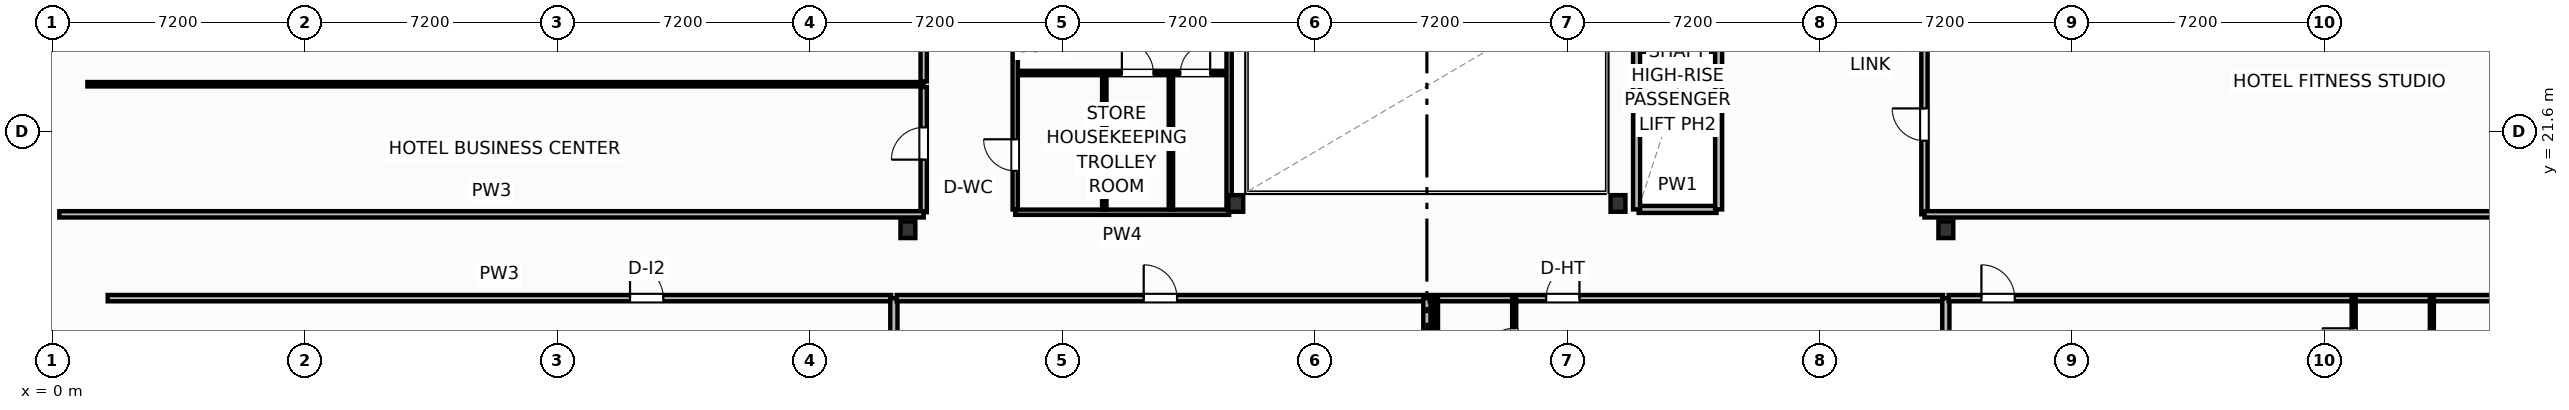
"""IFC4 building model, lengths in metres.
Left out: names, types, materials, properties, quantities, classifications, styles, units other than length and angle.
Written with IfcOpenShell. Run it as: python <this file> out.ifc"""

import sys

from ifc_helpers import new_model, si_unit, direction, frame, frame_2d, origin, origin_2d, place, context, subcontext, project, spatial, rectangle, i_section, extrude, element, fill, save


model = new_model("IFC4")
c1 = context("Model", 3, precision=1e-05, world=origin(), true_north=direction((0.0, 1.0)))
c2 = subcontext(c1, "Body", "Model", "MODEL_VIEW")
j1 = project(units=[si_unit("LENGTHUNIT", "METRE"), si_unit("PLANEANGLEUNIT", "RADIAN")], contexts=[c1])
p1 = place(None, origin())
s1 = spatial("IfcSite", under=j1, at=p1, CompositionType="ELEMENT")
p2 = place(p1, origin())
s2 = spatial("IfcBuilding", under=s1, at=p2, CompositionType="ELEMENT")
p3 = place(p2, frame((0.0, 0.0, 98.4)))
s3 = spatial("IfcBuildingStorey", under=s2, at=p3, CompositionType="ELEMENT", Elevation=98.4)
for number, where, z_axis, x_axis in (
    (1, (33.75, 19.55, 0.0), (0.0, 0.0, 1.0), (1.0, 0.0, 0.0)),
    (2, (44.65, 19.55, 0.0), (0.0, 0.0, 1.0), (1.0, 0.0, 0.0)),
    (3, (24.4, 18.8, 0.0), (0.0, 0.0, 1.0), (1.0, 0.0, 0.0)),
    (4, (54.0, 18.8, 0.0), (0.0, 0.0, 1.0), (1.0, 0.0, 0.0)),
):
    element("IfcColumn", number, at=place(p3, frame(where, z_axis=z_axis, x_axis=x_axis)), inside=s3, PredefinedType="COLUMN", context=c2, shape_type="SweptSolid", body=[
        extrude(i_section(OverallWidth=0.424, OverallDepth=0.474, WebThickness=0.048, FlangeThickness=0.077, FilletRadius=0.025, at=origin_2d()), origin(), (0.0, 0.0, 1.0), 3.7),
    ])
p4 = place(p3, frame((1.58, 16.85, 0.0), z_axis=(0.0, 0.0, 1.0), x_axis=(1.0, 0.0, 0.0)))
e5 = element("IfcWall", 5, at=p4, inside=s3, PredefinedType="PARTITIONING", context=c2, shape_type="SweptSolid", body=[
    extrude(rectangle(XDim=22.34, YDim=0.18, at=frame_2d((11.17, 0.0))), origin(), (0.0, 0.0, 1.0), 3.45),
])
p5 = place(p4, frame((14.895, 0.0, 0.0)))
e6 = element("IfcOpeningElement", 6, at=p5, cuts=e5, PredefinedType="OPENING", context=c2, shape_type="SweptSolid", body=[
    extrude(rectangle(XDim=0.95, YDim=2.05, at=frame_2d((0.475, 1.025))), frame((0.0, 0.1, 0.0), z_axis=(0.0, -1.0, 0.0), x_axis=(1.0, 0.0, 0.0)), (0.0, 0.0, 1.0), 0.2),
])
p6 = place(p3, frame((24.0, 6.076, 0.0), z_axis=(0.0, 0.0, 1.0), x_axis=(0.0, 1.0, 0.0)))
e7 = element("IfcWall", 7, at=p6, inside=s3, PredefinedType="PARTITIONING", context=c2, shape_type="SweptSolid", body=[
    extrude(rectangle(XDim=10.774, YDim=0.205, at=frame_2d((5.387, 0.0))), origin(), (0.0, 0.0, 1.0), 2.58),
])
p7 = place(p3, frame((24.08, 16.85, 0.0), z_axis=(0.0, 0.0, 1.0), x_axis=(1.0, 0.0, 0.0)))
e8 = element("IfcWall", 8, at=p7, inside=s3, PredefinedType="PARTITIONING", context=c2, shape_type="SweptSolid", body=[
    extrude(rectangle(XDim=15.04, YDim=0.18, at=frame_2d((7.52, 0.0))), origin(), (0.0, 0.0, 1.0), 3.45),
])
p8 = place(p7, frame((7.045, 0.0, 0.0)))
e9 = element("IfcOpeningElement", 9, at=p8, cuts=e8, PredefinedType="OPENING", context=c2, shape_type="SweptSolid", body=[
    extrude(rectangle(XDim=0.95, YDim=2.05, at=frame_2d((0.475, 1.025))), frame((0.0, 0.1, 0.0), z_axis=(0.0, -1.0, 0.0), x_axis=(1.0, 0.0, 0.0)), (0.0, 0.0, 1.0), 0.2),
])
p9 = place(p3, frame((39.2, 0.322, 0.0), z_axis=(0.0, 0.0, 1.0), x_axis=(0.0, 1.0, 0.0)))
e10 = element("IfcWall", 10, at=p9, inside=s3, PredefinedType="PARTITIONING", context=c2, shape_type="SweptSolid", body=[
    extrude(rectangle(XDim=16.528, YDim=0.205, at=frame_2d((8.264, 0.0))), origin(), (0.0, 0.0, 1.0), 3.45),
])
p10 = place(p3, frame((39.28, 16.85, 0.0), z_axis=(0.0, 0.0, 1.0), x_axis=(1.0, 0.0, 0.0)))
e11 = element("IfcWall", 11, at=p10, inside=s3, PredefinedType="PARTITIONING", context=c2, shape_type="SweptSolid", body=[
    extrude(rectangle(XDim=14.64, YDim=0.18, at=frame_2d((7.32, 0.0))), origin(), (0.0, 0.0, 1.0), 3.45),
])
p11 = place(p10, frame((3.322, 0.0, 0.0)))
e12 = element("IfcOpeningElement", 12, at=p11, cuts=e11, PredefinedType="OPENING", context=c2, shape_type="SweptSolid", body=[
    extrude(rectangle(XDim=0.95, YDim=2.15, at=frame_2d((0.475, 1.075))), frame((0.0, 0.1, 0.0), z_axis=(0.0, -1.0, 0.0), x_axis=(1.0, 0.0, 0.0)), (0.0, 0.0, 1.0), 0.2),
])
p12 = place(p3, frame((41.69, 14.33, 0.0), z_axis=(0.0, 0.0, 1.0), x_axis=(0.0, 1.0, 0.0)))
e13 = element("IfcWall", 13, at=p12, inside=s3, PredefinedType="PARTITIONING", context=c2, shape_type="SweptSolid", body=[
    extrude(rectangle(XDim=2.52, YDim=0.115, at=frame_2d((1.26, 0.0))), origin(), (0.0, 0.0, 1.0), 3.45),
])
p13 = place(p12, frame((0.76, 0.0, 0.0)))
e14 = element("IfcOpeningElement", 14, at=p13, cuts=e13, PredefinedType="OPENING", context=c2, shape_type="SweptSolid", body=[
    extrude(rectangle(XDim=0.9, YDim=2.05, at=frame_2d((0.45, 1.025))), frame((0.0, 0.067, 0.0), z_axis=(0.0, -1.0, 0.0), x_axis=(1.0, 0.0, 0.0)), (0.0, 0.0, 1.0), 0.135),
])
p14 = place(p3, frame((39.46, 14.33, 0.0), z_axis=(0.0, 0.0, 1.0), x_axis=(0.0, 1.0, 0.0)))
e15 = element("IfcWall", 15, at=p14, inside=s3, PredefinedType="PARTITIONING", context=c2, shape_type="SweptSolid", body=[
    extrude(rectangle(XDim=2.52, YDim=0.115, at=frame_2d((1.26, 0.0))), origin(), (0.0, 0.0, 1.0), 3.45),
])
p15 = place(p3, frame((54.0, -4.0, 0.0), z_axis=(0.0, 0.0, 1.0), x_axis=(0.0, 1.0, 0.0)))
e16 = element("IfcWall", 16, at=p15, inside=s3, PredefinedType="PARTITIONING", context=c2, shape_type="SweptSolid", body=[
    extrude(rectangle(XDim=20.85, YDim=0.205, at=frame_2d((10.425, 0.0))), origin(), (0.0, 0.0, 1.0), 3.45),
])
p16 = place(p3, frame((54.08, 16.85, 0.0), z_axis=(0.0, 0.0, 1.0), x_axis=(1.0, 0.0, 0.0)))
e17 = element("IfcWall", 17, at=p16, inside=s3, PredefinedType="PARTITIONING", context=c2, shape_type="SweptSolid", body=[
    extrude(rectangle(XDim=21.722, YDim=0.18, at=frame_2d((10.861, 0.0))), origin(), (0.0, 0.0, 1.0), 2.58),
])
p17 = place(p16, frame((0.934, 0.0, 0.0)))
e18 = element("IfcOpeningElement", 18, at=p17, cuts=e17, PredefinedType="OPENING", context=c2, shape_type="SweptSolid", body=[
    extrude(rectangle(XDim=0.95, YDim=2.15, at=frame_2d((0.475, 1.075))), frame((0.0, 0.1, 0.0), z_axis=(0.0, -1.0, 0.0), x_axis=(1.0, 0.0, 0.0)), (0.0, 0.0, 1.0), 0.2),
])
p18 = place(p3, frame((65.63, 14.33, 0.0), z_axis=(0.0, 0.0, 1.0), x_axis=(0.0, 1.0, 0.0)))
e19 = element("IfcWall", 19, at=p18, inside=s3, PredefinedType="PARTITIONING", context=c2, shape_type="SweptSolid", body=[
    extrude(rectangle(XDim=2.52, YDim=0.115, at=frame_2d((1.26, 0.0))), origin(), (0.0, 0.0, 1.0), 3.45),
])
p19 = place(p18, frame((0.76, 0.0, 0.0)))
e20 = element("IfcOpeningElement", 20, at=p19, cuts=e19, PredefinedType="OPENING", context=c2, shape_type="SweptSolid", body=[
    extrude(rectangle(XDim=0.9, YDim=2.05, at=frame_2d((0.45, 1.025))), frame((0.0, 0.067, 0.0), z_axis=(0.0, -1.0, 0.0), x_axis=(1.0, 0.0, 0.0)), (0.0, 0.0, 1.0), 0.135),
])
p20 = place(p3, frame((67.86, 14.33, 0.0), z_axis=(0.0, 0.0, 1.0), x_axis=(0.0, 1.0, 0.0)))
e21 = element("IfcWall", 21, at=p20, inside=s3, PredefinedType="PARTITIONING", context=c2, shape_type="SweptSolid", body=[
    extrude(rectangle(XDim=2.52, YDim=0.115, at=frame_2d((1.26, 0.0))), origin(), (0.0, 0.0, 1.0), 3.45),
])
p21 = place(p3, frame((24.85, 19.3, 0.0), z_axis=(0.0, 0.0, 1.0), x_axis=(0.0, 1.0, 0.0)))
e22 = element("IfcWall", 22, at=p21, inside=s3, PredefinedType="PARTITIONING", context=c2, shape_type="SweptSolid", body=[
    extrude(rectangle(XDim=3.57, YDim=0.18, at=frame_2d((1.785, 0.0))), origin(), (0.0, 0.0, 1.0), 3.45),
])
p22 = place(p21, frame((1.5, 0.0, 0.0)))
e23 = element("IfcOpeningElement", 23, at=p22, cuts=e22, PredefinedType="OPENING", context=c2, shape_type="SweptSolid", body=[
    extrude(rectangle(XDim=0.92, YDim=2.05, at=frame_2d((0.46, 1.025))), frame((0.0, 0.1, 0.0), z_axis=(0.0, -1.0, 0.0), x_axis=(1.0, 0.0, 0.0)), (0.0, 0.0, 1.0), 0.2),
])
p23 = place(p3, frame((24.85, 23.03, 0.0), z_axis=(0.0, 0.0, 1.0), x_axis=(0.0, 1.0, 0.0)))
e24 = element("IfcWall", 24, at=p23, inside=s3, PredefinedType="PARTITIONING", context=c2, shape_type="SweptSolid", body=[
    extrude(rectangle(XDim=3.57, YDim=0.18, at=frame_2d((1.785, 0.0))), origin(), (0.0, 0.0, 1.0), 3.45),
])
p24 = place(p23, frame((1.5, 0.0, 0.0)))
e25 = element("IfcOpeningElement", 25, at=p24, cuts=e24, PredefinedType="OPENING", context=c2, shape_type="SweptSolid", body=[
    extrude(rectangle(XDim=0.92, YDim=2.05, at=frame_2d((0.46, 1.025))), frame((0.0, 0.1, 0.0), z_axis=(0.0, -1.0, 0.0), x_axis=(1.0, 0.0, 0.0)), (0.0, 0.0, 1.0), 0.2),
])
p25 = place(p3, frame((1.0, 22.95, 0.0), z_axis=(0.0, 0.0, 1.0), x_axis=(1.0, 0.0, 0.0)))
e26 = element("IfcWall", 26, at=p25, inside=s3, PredefinedType="PARTITIONING", context=c2, shape_type="SweptSolid", body=[
    extrude(rectangle(XDim=23.85, YDim=0.125, at=frame_2d((11.925, 0.0))), origin(), (0.0, 0.0, 1.0), 3.45),
])
p26 = place(p3, frame((0.2, 19.24, 0.0), z_axis=(0.0, 0.0, 1.0), x_axis=(1.0, 0.0, 0.0)))
e27 = element("IfcWall", 27, at=p26, inside=s3, PredefinedType="PARTITIONING", context=c2, shape_type="SweptSolid", body=[
    extrude(rectangle(XDim=24.65, YDim=0.18, at=frame_2d((12.325, 0.0))), origin(), (0.0, 0.0, 1.0), 3.45),
])
p27 = place(p3, frame((53.39, 19.24, 0.0), z_axis=(0.0, 0.0, 1.0), x_axis=(0.0, 1.0, 0.0)))
e28 = element("IfcWall", 28, at=p27, inside=s3, PredefinedType="PARTITIONING", context=c2, shape_type="SweptSolid", body=[
    extrude(rectangle(XDim=7.52, YDim=0.18, at=frame_2d((3.76, 0.0))), origin(), (0.0, 0.0, 1.0), 3.45),
])
p28 = place(p27, frame((2.1, 0.0, 0.0)))
e29 = element("IfcOpeningElement", 29, at=p28, cuts=e28, PredefinedType="OPENING", context=c2, shape_type="SweptSolid", body=[
    extrude(rectangle(XDim=0.92, YDim=2.05, at=frame_2d((0.46, 1.025))), frame((0.0, 0.1, 0.0), z_axis=(0.0, -1.0, 0.0), x_axis=(1.0, 0.0, 0.0)), (0.0, 0.0, 1.0), 0.2),
])
p29 = place(p3, frame((53.39, 19.24, 0.0), z_axis=(0.0, 0.0, 1.0), x_axis=(1.0, 0.0, 0.0)))
e30 = element("IfcWall", 30, at=p29, inside=s3, PredefinedType="PARTITIONING", context=c2, shape_type="SweptSolid", body=[
    extrude(rectangle(XDim=23.317, YDim=0.18, at=frame_2d((11.658, 0.0))), origin(), (0.0, 0.0, 1.0), 3.45),
])
p30 = place(p3, frame((27.46, 19.3, 0.0), z_axis=(0.0, 0.0, 1.0), x_axis=(1.0, 0.0, 0.0)))
e31 = element("IfcWall", 31, at=p30, inside=s3, PredefinedType="PARTITIONING", context=c2, shape_type="SweptSolid", body=[
    extrude(rectangle(XDim=6.1, YDim=0.15, at=frame_2d((3.05, 0.0))), origin(), (0.0, 0.0, 1.0), 2.662),
])
p31 = place(p3, frame((27.52, 23.27, 0.0), z_axis=(0.0, 0.0, 1.0), x_axis=(1.0, 0.0, 0.0)))
e32 = element("IfcWall", 32, at=p31, inside=s3, PredefinedType="PARTITIONING", context=c2, shape_type="SweptSolid", body=[
    extrude(rectangle(XDim=6.0, YDim=0.125, at=frame_2d((3.0, 0.0))), origin(), (0.0, 0.0, 1.0), 3.45),
])
p32 = place(p31, frame((2.982, 0.0, 0.0)))
e33 = element("IfcOpeningElement", 33, at=p32, cuts=e32, PredefinedType="OPENING", context=c2, shape_type="SweptSolid", body=[
    extrude(rectangle(XDim=0.9, YDim=2.05, at=frame_2d((0.45, 1.025))), frame((0.0, 0.073, 0.0), z_axis=(0.0, -1.0, 0.0), x_axis=(1.0, 0.0, 0.0)), (0.0, 0.0, 1.0), 0.145),
])
p33 = place(p31, frame((4.65, 0.0, 0.0)))
e34 = element("IfcOpeningElement", 34, at=p33, cuts=e32, PredefinedType="OPENING", context=c2, shape_type="SweptSolid", body=[
    extrude(rectangle(XDim=0.85, YDim=2.05, at=frame_2d((0.425, 1.025))), frame((0.0, 0.073, 0.0), z_axis=(0.0, -1.0, 0.0), x_axis=(1.0, 0.0, 0.0)), (0.0, 0.0, 1.0), 0.145),
])
for number, where, z_axis, x_axis in (
    (35, (30.0, 19.38, 0.0), (0.0, 0.0, 1.0), (0.0, 1.0, 0.0)),
    (36, (31.9, 19.38, 0.0), (0.0, 0.0, 1.0), (0.0, 1.0, 0.0)),
):
    element("IfcWall", number, at=place(p3, frame(where, z_axis=z_axis, x_axis=x_axis)), inside=s3, PredefinedType="PARTITIONING", context=c2, shape_type="SweptSolid", body=[
        extrude(rectangle(XDim=3.82, YDim=0.125, at=frame_2d((1.91, 0.0))), origin(), (0.0, 0.0, 1.0), 3.45),
    ])
p34 = place(p3, frame((27.46, 19.38, 0.0), z_axis=(0.0, 0.0, 1.0), x_axis=(0.0, 1.0, 0.0)))
e37 = element("IfcWall", 37, at=p34, inside=s3, PredefinedType="PARTITIONING", context=c2, shape_type="SweptSolid", body=[
    extrude(rectangle(XDim=7.16, YDim=0.15, at=frame_2d((3.58, 0.0))), origin(), (0.0, 0.0, 1.0), 3.45),
])
p35 = place(p34, frame((1.1, 0.0, 0.0)))
e38 = element("IfcOpeningElement", 38, at=p35, cuts=e37, PredefinedType="OPENING", context=c2, shape_type="SweptSolid", body=[
    extrude(rectangle(XDim=0.9, YDim=2.05, at=frame_2d((0.45, 1.025))), frame((0.0, 0.085, 0.0), z_axis=(0.0, -1.0, 0.0), x_axis=(1.0, 0.0, 0.0)), (0.0, 0.0, 1.0), 0.17),
])
p36 = place(p3, frame((33.56, 19.38, 0.0), z_axis=(0.0, 0.0, 1.0), x_axis=(0.0, 1.0, 0.0)))
e39 = element("IfcWall", 39, at=p36, inside=s3, PredefinedType="PARTITIONING", context=c2, shape_type="SweptSolid", body=[
    extrude(rectangle(XDim=7.16, YDim=0.15, at=frame_2d((3.58, 0.0))), origin(), (0.0, 0.0, 1.0), 2.824),
])
p37 = place(p3, frame((45.24, 21.675, 0.0), z_axis=(0.0, 0.0, 1.0), x_axis=(1.0, 0.0, 0.0)))
e40 = element("IfcWall", 40, at=p37, inside=s3, PredefinedType="PARTITIONING", context=c2, shape_type="SweptSolid", body=[
    extrude(rectangle(XDim=2.22, YDim=0.2, at=frame_2d((1.11, 0.0))), origin(), (0.0, 0.0, 1.0), 3.45),
])
p38 = place(p3, frame((45.24, 19.38, 0.0), z_axis=(0.0, 0.0, 1.0), x_axis=(1.0, 0.0, 0.0)))
e41 = element("IfcWall", 41, at=p38, inside=s3, PredefinedType="PARTITIONING", context=c2, shape_type="SweptSolid", body=[
    extrude(rectangle(XDim=2.22, YDim=0.2, at=frame_2d((1.11, 0.0))), origin(), (0.0, 0.0, 1.0), 2.662),
])
for number, where, z_axis, x_axis in (
    (42, (45.18, 19.38, 0.0), (0.0, 0.0, 1.0), (0.0, 1.0, 0.0)),
    (43, (47.52, 19.38, 0.0), (0.0, 0.0, 1.0), (0.0, 1.0, 0.0)),
):
    element("IfcWall", number, at=place(p3, frame(where, z_axis=z_axis, x_axis=x_axis)), inside=s3, PredefinedType="PARTITIONING", context=c2, shape_type="SweptSolid", body=[
        extrude(rectangle(XDim=6.9, YDim=0.2, at=frame_2d((3.45, 0.0))), origin(), (0.0, 0.0, 1.0), 3.45),
    ])
p39 = place(p5, origin())
e44 = element("IfcDoor", 44, at=p39, inside=s3, OperationType="SINGLE_SWING_LEFT", PredefinedType="DOOR", context=c2, shape_type="SweptSolid", body=[
    extrude(rectangle(XDim=0.95, YDim=2.05, at=frame_2d((0.475, 1.025))), frame((0.0, 0.025, 0.0), z_axis=(0.0, -1.0, 0.0), x_axis=(1.0, 0.0, 0.0)), (0.0, 0.0, 1.0), 0.05),
])
fill(e6, e44)
p40 = place(p8, origin())
e45 = element("IfcDoor", 45, at=p40, inside=s3, OperationType="SINGLE_SWING_LEFT", PredefinedType="DOOR", context=c2, shape_type="SweptSolid", body=[
    extrude(rectangle(XDim=0.95, YDim=2.05, at=frame_2d((0.475, 1.025))), frame((0.0, 0.025, 0.0), z_axis=(0.0, -1.0, 0.0), x_axis=(1.0, 0.0, 0.0)), (0.0, 0.0, 1.0), 0.05),
])
fill(e9, e45)
p41 = place(p11, origin())
e46 = element("IfcDoor", 46, at=p41, inside=s3, OperationType="SINGLE_SWING_RIGHT", PredefinedType="DOOR", context=c2, shape_type="SweptSolid", body=[
    extrude(rectangle(XDim=0.95, YDim=2.15, at=frame_2d((0.475, 1.075))), frame((0.0, 0.025, 0.0), z_axis=(0.0, -1.0, 0.0), x_axis=(1.0, 0.0, 0.0)), (0.0, 0.0, 1.0), 0.05),
])
fill(e12, e46)
p42 = place(p13, origin())
e47 = element("IfcDoor", 47, at=p42, inside=s3, OperationType="SINGLE_SWING_LEFT", PredefinedType="DOOR", context=c2, shape_type="SweptSolid", body=[
    extrude(rectangle(XDim=0.9, YDim=2.05, at=frame_2d((0.45, 1.025))), frame((0.0, 0.025, 0.0), z_axis=(0.0, -1.0, 0.0), x_axis=(1.0, 0.0, 0.0)), (0.0, 0.0, 1.0), 0.05),
])
fill(e14, e47)
p43 = place(p17, origin())
e48 = element("IfcDoor", 48, at=p43, inside=s3, OperationType="SINGLE_SWING_LEFT", PredefinedType="DOOR", context=c2, shape_type="SweptSolid", body=[
    extrude(rectangle(XDim=0.95, YDim=2.15, at=frame_2d((0.475, 1.075))), frame((0.0, 0.025, 0.0), z_axis=(0.0, -1.0, 0.0), x_axis=(1.0, 0.0, 0.0)), (0.0, 0.0, 1.0), 0.05),
])
fill(e18, e48)
p44 = place(p19, origin())
e49 = element("IfcDoor", 49, at=p44, inside=s3, OperationType="SINGLE_SWING_RIGHT", PredefinedType="DOOR", context=c2, shape_type="SweptSolid", body=[
    extrude(rectangle(XDim=0.9, YDim=2.05, at=frame_2d((0.45, 1.025))), frame((0.0, 0.025, 0.0), z_axis=(0.0, -1.0, 0.0), x_axis=(1.0, 0.0, 0.0)), (0.0, 0.0, 1.0), 0.05),
])
fill(e20, e49)
p45 = place(p22, origin())
e50 = element("IfcDoor", 50, at=p45, inside=s3, OperationType="SINGLE_SWING_LEFT", PredefinedType="DOOR", context=c2, shape_type="SweptSolid", body=[
    extrude(rectangle(XDim=0.92, YDim=2.05, at=frame_2d((0.46, 1.025))), frame((0.0, 0.025, 0.0), z_axis=(0.0, -1.0, 0.0), x_axis=(1.0, 0.0, 0.0)), (0.0, 0.0, 1.0), 0.05),
])
fill(e23, e50)
p46 = place(p28, origin())
e51 = element("IfcDoor", 51, at=p46, inside=s3, OperationType="SINGLE_SWING_RIGHT", PredefinedType="DOOR", context=c2, shape_type="SweptSolid", body=[
    extrude(rectangle(XDim=0.92, YDim=2.05, at=frame_2d((0.46, 1.025))), frame((0.0, 0.025, 0.0), z_axis=(0.0, -1.0, 0.0), x_axis=(1.0, 0.0, 0.0)), (0.0, 0.0, 1.0), 0.05),
])
fill(e29, e51)
p47 = place(p32, origin())
e52 = element("IfcDoor", 52, at=p47, inside=s3, OperationType="SINGLE_SWING_LEFT", PredefinedType="DOOR", context=c2, shape_type="SweptSolid", body=[
    extrude(rectangle(XDim=0.9, YDim=2.05, at=frame_2d((0.45, 1.025))), frame((0.0, 0.025, 0.0), z_axis=(0.0, -1.0, 0.0), x_axis=(1.0, 0.0, 0.0)), (0.0, 0.0, 1.0), 0.05),
])
fill(e33, e52)
p48 = place(p33, origin())
e53 = element("IfcDoor", 53, at=p48, inside=s3, OperationType="SINGLE_SWING_RIGHT", PredefinedType="DOOR", context=c2, shape_type="SweptSolid", body=[
    extrude(rectangle(XDim=0.85, YDim=2.05, at=frame_2d((0.425, 1.025))), frame((0.0, 0.025, 0.0), z_axis=(0.0, -1.0, 0.0), x_axis=(1.0, 0.0, 0.0)), (0.0, 0.0, 1.0), 0.05),
])
fill(e34, e53)
p49 = place(p35, origin())
e54 = element("IfcDoor", 54, at=p49, inside=s3, OperationType="SINGLE_SWING_RIGHT", PredefinedType="DOOR", context=c2, shape_type="SweptSolid", body=[
    extrude(rectangle(XDim=0.9, YDim=2.05, at=frame_2d((0.45, 1.025))), frame((0.0, 0.025, 0.0), z_axis=(0.0, -1.0, 0.0), x_axis=(1.0, 0.0, 0.0)), (0.0, 0.0, 1.0), 0.05),
])
fill(e38, e54)
save(model, sys.argv[1])
